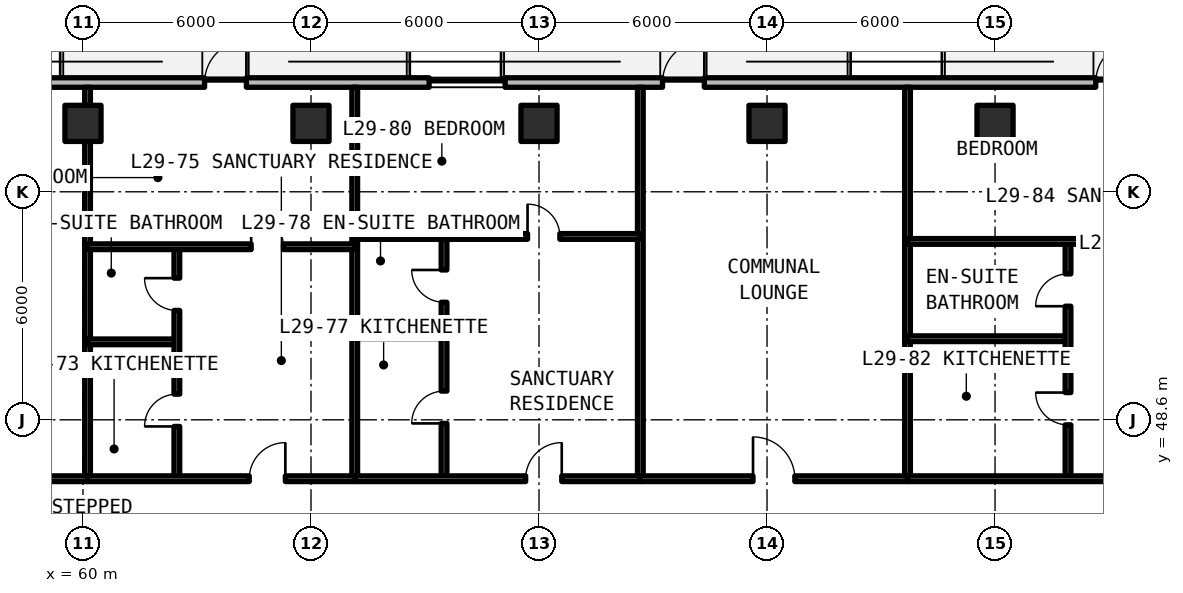
"""IFC4 building model, lengths in metres.
Left out: names, types, materials, properties, quantities, classifications, styles, units other than length and angle.
Written with IfcOpenShell. Run it as: python <this file> out.ifc"""

import sys

from ifc_helpers import new_model, si_unit, direction, frame, frame_2d, origin, origin_2d, place, context, subcontext, project, spatial, rectangle, extrude, element, fill, save


model = new_model("IFC4")
c1 = context("Model", 3, precision=1e-05, world=origin(), true_north=direction((0.0, 1.0)))
c2 = subcontext(c1, "Body", "Model", "MODEL_VIEW")
j1 = project(units=[si_unit("LENGTHUNIT", "METRE"), si_unit("PLANEANGLEUNIT", "RADIAN")], contexts=[c1])
p1 = place(None, origin())
s1 = spatial("IfcSite", under=j1, at=p1, CompositionType="ELEMENT")
p2 = place(p1, origin())
s2 = spatial("IfcBuilding", under=s1, at=p2, CompositionType="ELEMENT")
p3 = place(p2, frame((0.0, 0.0, 105.27)))
s3 = spatial("IfcBuildingStorey", under=s2, at=p3, CompositionType="ELEMENT", Elevation=105.27)
for number, where, z_axis, x_axis in (
    (1, (60.0, 56.4, 0.0), (0.0, 0.0, 1.0), (1.0, 0.0, 0.0)),
    (2, (66.0, 56.4, 0.0), (0.0, 0.0, 1.0), (1.0, 0.0, 0.0)),
    (3, (72.0, 56.4, 0.0), (0.0, 0.0, 1.0), (1.0, 0.0, 0.0)),
    (4, (78.0, 56.4, 0.0), (0.0, 0.0, 1.0), (1.0, 0.0, 0.0)),
    (5, (84.0, 56.4, 0.0), (0.0, 0.0, 1.0), (1.0, 0.0, 0.0)),
):
    element("IfcColumn", number, at=place(p3, frame(where, z_axis=z_axis, x_axis=x_axis)), inside=s3, PredefinedType="COLUMN", context=c2, shape_type="SweptSolid", body=[
        extrude(rectangle(XDim=0.95, YDim=0.95, at=origin_2d()), origin(), (0.0, 0.0, 1.0), 3.3),
    ])
p4 = place(p3, frame((96.148, 57.475, 0.0), z_axis=(0.0, 0.0, 1.0), x_axis=(-1.0, 0.0, 0.0)))
e6 = element("IfcWall", 6, at=p4, inside=s3, PredefinedType="SOLIDWALL", context=c2, shape_type="SweptSolid", body=[
    extrude(rectangle(XDim=44.023, YDim=0.25, at=frame_2d((22.012, 0.0))), origin(), (0.0, 0.0, 1.0), 3.08),
])
p5 = place(p4, frame((31.848, 0.0, 0.0)))
e7 = element("IfcOpeningElement", 7, at=p5, cuts=e6, PredefinedType="OPENING", context=c2, shape_type="SweptSolid", body=[
    extrude(rectangle(XDim=1.1, YDim=2.15, at=frame_2d((0.55, 1.075))), frame((0.0, 0.135, 0.0), z_axis=(0.0, -1.0, 0.0), x_axis=(1.0, 0.0, 0.0)), (0.0, 0.0, 1.0), 0.27),
])
p6 = place(p4, frame((19.798, 0.0, 0.0)))
e8 = element("IfcOpeningElement", 8, at=p6, cuts=e6, PredefinedType="OPENING", context=c2, shape_type="SweptSolid", body=[
    extrude(rectangle(XDim=1.1, YDim=2.15, at=frame_2d((0.55, 1.075))), frame((0.0, 0.135, 0.0), z_axis=(0.0, -1.0, 0.0), x_axis=(1.0, 0.0, 0.0)), (0.0, 0.0, 1.0), 0.27),
])
p7 = place(p4, frame((8.398, 0.0, 0.0)))
e9 = element("IfcOpeningElement", 9, at=p7, cuts=e6, PredefinedType="OPENING", context=c2, shape_type="SweptSolid", body=[
    extrude(rectangle(XDim=1.1, YDim=2.15, at=frame_2d((0.55, 1.075))), frame((0.0, 0.135, 0.0), z_axis=(0.0, -1.0, 0.0), x_axis=(1.0, 0.0, 0.0)), (0.0, 0.0, 1.0), 0.27),
])
p8 = place(p4, frame((39.028, 0.0, 0.78)))
e10 = element("IfcOpeningElement", 10, at=p8, cuts=e6, PredefinedType="OPENING", context=c2, shape_type="SweptSolid", body=[
    extrude(rectangle(XDim=2.0, YDim=1.66, at=frame_2d((1.0, 0.83))), frame((0.0, 0.135, 0.0), z_axis=(0.0, -1.0, 0.0), x_axis=(1.0, 0.0, 0.0)), (0.0, 0.0, 1.0), 0.27),
])
p9 = place(p4, frame((25.04, 0.0, 0.78)))
e11 = element("IfcOpeningElement", 11, at=p9, cuts=e6, PredefinedType="OPENING", context=c2, shape_type="SweptSolid", body=[
    extrude(rectangle(XDim=2.0, YDim=1.66, at=frame_2d((1.0, 0.83))), frame((0.0, 0.135, 0.0), z_axis=(0.0, -1.0, 0.0), x_axis=(1.0, 0.0, 0.0)), (0.0, 0.0, 1.0), 0.27),
])
p10 = place(p4, frame((2.664, 0.0, 0.78)))
e12 = element("IfcOpeningElement", 12, at=p10, cuts=e6, PredefinedType="OPENING", context=c2, shape_type="SweptSolid", body=[
    extrude(rectangle(XDim=2.0, YDim=1.66, at=frame_2d((1.0, 0.83))), frame((0.0, 0.135, 0.0), z_axis=(0.0, -1.0, 0.0), x_axis=(1.0, 0.0, 0.0)), (0.0, 0.0, 1.0), 0.27),
])
p11 = place(p3, frame((60.12, 47.05, 0.0), z_axis=(0.0, 0.0, 1.0), x_axis=(0.0, 1.0, 0.0)))
e13 = element("IfcWall", 13, at=p11, inside=s3, PredefinedType="SOLIDWALL", context=c2, shape_type="SweptSolid", body=[
    extrude(rectangle(XDim=10.3, YDim=0.15, at=frame_2d((5.15, 0.0))), origin(), (0.0, 0.0, 1.0), 2.35),
])
p12 = place(p3, frame((52.12, 47.05, 0.0), z_axis=(0.0, 0.0, 1.0), x_axis=(1.0, 0.0, 0.0)))
e14 = element("IfcWall", 14, at=p12, inside=s3, PredefinedType="SOLIDWALL", context=c2, shape_type="SweptSolid", body=[
    extrude(rectangle(XDim=8.0, YDim=0.15, at=frame_2d((4.0, 0.0))), origin(), (0.0, 0.0, 1.0), 2.35),
])
p13 = place(p12, frame((3.45, 0.0, 0.0)))
e15 = element("IfcOpeningElement", 15, at=p13, cuts=e14, PredefinedType="OPENING", context=c2, shape_type="SweptSolid", body=[
    extrude(rectangle(XDim=1.1, YDim=2.15, at=frame_2d((0.55, 1.075))), frame((0.0, 0.085, 0.0), z_axis=(0.0, -1.0, 0.0), x_axis=(1.0, 0.0, 0.0)), (0.0, 0.0, 1.0), 0.17),
])
p14 = place(p3, frame((67.151, 47.05, 0.0), z_axis=(0.0, 0.0, 1.0), x_axis=(0.0, 1.0, 0.0)))
e16 = element("IfcWall", 16, at=p14, inside=s3, PredefinedType="SOLIDWALL", context=c2, shape_type="SweptSolid", body=[
    extrude(rectangle(XDim=10.3, YDim=0.15, at=frame_2d((5.15, 0.0))), origin(), (0.0, 0.0, 1.0), 2.35),
])
p15 = place(p3, frame((60.12, 50.651, 0.0), z_axis=(0.0, 0.0, 1.0), x_axis=(1.0, 0.0, 0.0)))
e17 = element("IfcWall", 17, at=p15, inside=s3, PredefinedType="PARTITIONING", context=c2, shape_type="SweptSolid", body=[
    extrude(rectangle(XDim=2.35, YDim=0.15, at=frame_2d((1.175, 0.0))), origin(), (0.0, 0.0, 1.0), 2.35),
])
p16 = place(p3, frame((62.47, 47.05, 0.0), z_axis=(0.0, 0.0, 1.0), x_axis=(0.0, 1.0, 0.0)))
e18 = element("IfcWall", 18, at=p16, inside=s3, PredefinedType="PARTITIONING", context=c2, shape_type="SweptSolid", body=[
    extrude(rectangle(XDim=6.104, YDim=0.15, at=frame_2d((3.052, 0.0))), origin(), (0.0, 0.0, 1.0), 2.35),
])
p17 = place(p16, frame((1.376, 0.0, 0.0)))
e19 = element("IfcOpeningElement", 19, at=p17, cuts=e18, PredefinedType="OPENING", context=c2, shape_type="SweptSolid", body=[
    extrude(rectangle(XDim=0.85, YDim=2.1, at=frame_2d((0.425, 1.05))), frame((0.0, 0.085, 0.0), z_axis=(0.0, -1.0, 0.0), x_axis=(1.0, 0.0, 0.0)), (0.0, 0.0, 1.0), 0.17),
])
p18 = place(p16, frame((4.428, 0.0, 0.0)))
e20 = element("IfcOpeningElement", 20, at=p18, cuts=e18, PredefinedType="OPENING", context=c2, shape_type="SweptSolid", body=[
    extrude(rectangle(XDim=0.85, YDim=2.1, at=frame_2d((0.425, 1.05))), frame((0.0, 0.085, 0.0), z_axis=(0.0, -1.0, 0.0), x_axis=(1.0, 0.0, 0.0)), (0.0, 0.0, 1.0), 0.17),
])
p19 = place(p3, frame((60.12, 53.154, 0.0), z_axis=(0.0, 0.0, 1.0), x_axis=(1.0, 0.0, 0.0)))
e21 = element("IfcWall", 21, at=p19, inside=s3, PredefinedType="PARTITIONING", context=c2, shape_type="SweptSolid", body=[
    extrude(rectangle(XDim=7.031, YDim=0.15, at=frame_2d((3.515, 0.0))), origin(), (0.0, 0.0, 1.0), 2.35),
])
p20 = place(p19, frame((4.305, 0.0, 0.0)))
e22 = element("IfcOpeningElement", 22, at=p20, cuts=e21, PredefinedType="OPENING", context=c2, shape_type="SweptSolid", body=[
    extrude(rectangle(XDim=0.85, YDim=2.1, at=frame_2d((0.425, 1.05))), frame((0.0, 0.085, 0.0), z_axis=(0.0, -1.0, 0.0), x_axis=(1.0, 0.0, 0.0)), (0.0, 0.0, 1.0), 0.17),
])
p21 = place(p3, frame((60.12, 47.05, 0.0), z_axis=(0.0, 0.0, 1.0), x_axis=(1.0, 0.0, 0.0)))
e23 = element("IfcWall", 23, at=p21, inside=s3, PredefinedType="SOLIDWALL", context=c2, shape_type="SweptSolid", body=[
    extrude(rectangle(XDim=7.031, YDim=0.15, at=frame_2d((3.515, 0.0))), origin(), (0.0, 0.0, 1.0), 2.35),
])
p22 = place(p21, frame((4.255, 0.0, 0.0)))
e24 = element("IfcOpeningElement", 24, at=p22, cuts=e23, PredefinedType="OPENING", context=c2, shape_type="SweptSolid", body=[
    extrude(rectangle(XDim=0.95, YDim=2.15, at=frame_2d((0.475, 1.075))), frame((0.0, 0.085, 0.0), z_axis=(0.0, -1.0, 0.0), x_axis=(1.0, 0.0, 0.0)), (0.0, 0.0, 1.0), 0.17),
])
p23 = place(p3, frame((74.666, 47.05, 0.0), z_axis=(0.0, 0.0, 1.0), x_axis=(0.0, 1.0, 0.0)))
e25 = element("IfcWall", 25, at=p23, inside=s3, PredefinedType="SOLIDWALL", context=c2, shape_type="SweptSolid", body=[
    extrude(rectangle(XDim=10.3, YDim=0.15, at=frame_2d((5.15, 0.0))), origin(), (0.0, 0.0, 1.0), 2.35),
])
p24 = place(p3, frame((67.151, 50.811, 0.0), z_axis=(0.0, 0.0, 1.0), x_axis=(1.0, 0.0, 0.0)))
e26 = element("IfcWall", 26, at=p24, inside=s3, PredefinedType="PARTITIONING", context=c2, shape_type="SweptSolid", body=[
    extrude(rectangle(XDim=2.35, YDim=0.15, at=frame_2d((1.175, 0.0))), origin(), (0.0, 0.0, 1.0), 2.35),
])
p25 = place(p3, frame((69.501, 47.05, 0.0), z_axis=(0.0, 0.0, 1.0), x_axis=(0.0, 1.0, 0.0)))
e27 = element("IfcWall", 27, at=p25, inside=s3, PredefinedType="PARTITIONING", context=c2, shape_type="SweptSolid", body=[
    extrude(rectangle(XDim=6.375, YDim=0.15, at=frame_2d((3.188, 0.0))), origin(), (0.0, 0.0, 1.0), 2.35),
])
p26 = place(p25, frame((1.456, 0.0, 0.0)))
e28 = element("IfcOpeningElement", 28, at=p26, cuts=e27, PredefinedType="OPENING", context=c2, shape_type="SweptSolid", body=[
    extrude(rectangle(XDim=0.85, YDim=2.1, at=frame_2d((0.425, 1.05))), frame((0.0, 0.085, 0.0), z_axis=(0.0, -1.0, 0.0), x_axis=(1.0, 0.0, 0.0)), (0.0, 0.0, 1.0), 0.17),
])
p27 = place(p25, frame((4.643, 0.0, 0.0)))
e29 = element("IfcOpeningElement", 29, at=p27, cuts=e27, PredefinedType="OPENING", context=c2, shape_type="SweptSolid", body=[
    extrude(rectangle(XDim=0.85, YDim=2.1, at=frame_2d((0.425, 1.05))), frame((0.0, 0.085, 0.0), z_axis=(0.0, -1.0, 0.0), x_axis=(1.0, 0.0, 0.0)), (0.0, 0.0, 1.0), 0.17),
])
p28 = place(p3, frame((67.151, 53.425, 0.0), z_axis=(0.0, 0.0, 1.0), x_axis=(1.0, 0.0, 0.0)))
e30 = element("IfcWall", 30, at=p28, inside=s3, PredefinedType="PARTITIONING", context=c2, shape_type="SweptSolid", body=[
    extrude(rectangle(XDim=7.515, YDim=0.15, at=frame_2d((3.758, 0.0))), origin(), (0.0, 0.0, 1.0), 2.35),
])
p29 = place(p28, frame((4.548, 0.0, 0.0)))
e31 = element("IfcOpeningElement", 31, at=p29, cuts=e30, PredefinedType="OPENING", context=c2, shape_type="SweptSolid", body=[
    extrude(rectangle(XDim=0.85, YDim=2.1, at=frame_2d((0.425, 1.05))), frame((0.0, 0.085, 0.0), z_axis=(0.0, -1.0, 0.0), x_axis=(1.0, 0.0, 0.0)), (0.0, 0.0, 1.0), 0.17),
])
p30 = place(p3, frame((67.151, 47.05, 0.0), z_axis=(0.0, 0.0, 1.0), x_axis=(1.0, 0.0, 0.0)))
e32 = element("IfcWall", 32, at=p30, inside=s3, PredefinedType="SOLIDWALL", context=c2, shape_type="SweptSolid", body=[
    extrude(rectangle(XDim=7.515, YDim=0.15, at=frame_2d((3.758, 0.0))), origin(), (0.0, 0.0, 1.0), 2.35),
])
p31 = place(p30, frame((4.498, 0.0, 0.0)))
e33 = element("IfcOpeningElement", 33, at=p31, cuts=e32, PredefinedType="OPENING", context=c2, shape_type="SweptSolid", body=[
    extrude(rectangle(XDim=0.95, YDim=2.15, at=frame_2d((0.475, 1.075))), frame((0.0, 0.085, 0.0), z_axis=(0.0, -1.0, 0.0), x_axis=(1.0, 0.0, 0.0)), (0.0, 0.0, 1.0), 0.17),
])
p32 = place(p3, frame((81.697, 47.05, 0.0), z_axis=(0.0, 0.0, 1.0), x_axis=(0.0, 1.0, 0.0)))
e34 = element("IfcWall", 34, at=p32, inside=s3, PredefinedType="SOLIDWALL", context=c2, shape_type="SweptSolid", body=[
    extrude(rectangle(XDim=10.3, YDim=0.15, at=frame_2d((5.15, 0.0))), origin(), (0.0, 0.0, 1.0), 2.35),
])
p33 = place(p3, frame((74.666, 47.05, 0.0), z_axis=(0.0, 0.0, 1.0), x_axis=(1.0, 0.0, 0.0)))
e35 = element("IfcWall", 35, at=p33, inside=s3, PredefinedType="SOLIDWALL", context=c2, shape_type="SweptSolid", body=[
    extrude(rectangle(XDim=7.031, YDim=0.15, at=frame_2d((3.515, 0.0))), origin(), (0.0, 0.0, 1.0), 2.35),
])
p34 = place(p33, frame((2.965, 0.0, 0.0)))
e36 = element("IfcOpeningElement", 36, at=p34, cuts=e35, PredefinedType="OPENING", context=c2, shape_type="SweptSolid", body=[
    extrude(rectangle(XDim=1.1, YDim=2.15, at=frame_2d((0.55, 1.075))), frame((0.0, 0.085, 0.0), z_axis=(0.0, -1.0, 0.0), x_axis=(1.0, 0.0, 0.0)), (0.0, 0.0, 1.0), 0.17),
])
p35 = place(p3, frame((81.697, 50.734, 0.0), z_axis=(0.0, 0.0, 1.0), x_axis=(1.0, 0.0, 0.0)))
e37 = element("IfcWall", 37, at=p35, inside=s3, PredefinedType="PARTITIONING", context=c2, shape_type="SweptSolid", body=[
    extrude(rectangle(XDim=4.223, YDim=0.15, at=frame_2d((2.112, 0.0))), origin(), (0.0, 0.0, 1.0), 2.35),
])
p36 = place(p3, frame((85.92, 47.05, 0.0), z_axis=(0.0, 0.0, 1.0), x_axis=(0.0, 1.0, 0.0)))
e38 = element("IfcWall", 38, at=p36, inside=s3, PredefinedType="PARTITIONING", context=c2, shape_type="SweptSolid", body=[
    extrude(rectangle(XDim=6.244, YDim=0.15, at=frame_2d((3.122, 0.0))), origin(), (0.0, 0.0, 1.0), 2.35),
])
p37 = place(p36, frame((1.417, 0.0, 0.0)))
e39 = element("IfcOpeningElement", 39, at=p37, cuts=e38, PredefinedType="OPENING", context=c2, shape_type="SweptSolid", body=[
    extrude(rectangle(XDim=0.85, YDim=2.1, at=frame_2d((0.425, 1.05))), frame((0.0, 0.085, 0.0), z_axis=(0.0, -1.0, 0.0), x_axis=(1.0, 0.0, 0.0)), (0.0, 0.0, 1.0), 0.17),
])
p38 = place(p36, frame((4.539, 0.0, 0.0)))
e40 = element("IfcOpeningElement", 40, at=p38, cuts=e38, PredefinedType="OPENING", context=c2, shape_type="SweptSolid", body=[
    extrude(rectangle(XDim=0.85, YDim=2.1, at=frame_2d((0.425, 1.05))), frame((0.0, 0.085, 0.0), z_axis=(0.0, -1.0, 0.0), x_axis=(1.0, 0.0, 0.0)), (0.0, 0.0, 1.0), 0.17),
])
p39 = place(p3, frame((81.697, 53.294, 0.0), z_axis=(0.0, 0.0, 1.0), x_axis=(1.0, 0.0, 0.0)))
e41 = element("IfcWall", 41, at=p39, inside=s3, PredefinedType="PARTITIONING", context=c2, shape_type="SweptSolid", body=[
    extrude(rectangle(XDim=7.273, YDim=0.15, at=frame_2d((3.636, 0.0))), origin(), (0.0, 0.0, 1.0), 2.35),
])
p40 = place(p39, frame((5.363, 0.0, 0.0)))
e42 = element("IfcOpeningElement", 42, at=p40, cuts=e41, PredefinedType="OPENING", context=c2, shape_type="SweptSolid", body=[
    extrude(rectangle(XDim=0.85, YDim=2.1, at=frame_2d((0.425, 1.05))), frame((0.0, 0.085, 0.0), z_axis=(0.0, -1.0, 0.0), x_axis=(1.0, 0.0, 0.0)), (0.0, 0.0, 1.0), 0.17),
])
p41 = place(p3, frame((81.697, 47.05, 0.0), z_axis=(0.0, 0.0, 1.0), x_axis=(1.0, 0.0, 0.0)))
e43 = element("IfcWall", 43, at=p41, inside=s3, PredefinedType="SOLIDWALL", context=c2, shape_type="SweptSolid", body=[
    extrude(rectangle(XDim=7.273, YDim=0.15, at=frame_2d((3.636, 0.0))), origin(), (0.0, 0.0, 1.0), 2.35),
])
p42 = place(p41, frame((5.313, 0.0, 0.0)))
e44 = element("IfcOpeningElement", 44, at=p42, cuts=e43, PredefinedType="OPENING", context=c2, shape_type="SweptSolid", body=[
    extrude(rectangle(XDim=0.95, YDim=2.15, at=frame_2d((0.475, 1.075))), frame((0.0, 0.085, 0.0), z_axis=(0.0, -1.0, 0.0), x_axis=(1.0, 0.0, 0.0)), (0.0, 0.0, 1.0), 0.17),
])
p43 = place(p5, frame((1.1, 0.0, 0.0), z_axis=(0.0, 0.0, 1.0), x_axis=(-1.0, 0.0, 0.0)))
e45 = element("IfcDoor", 45, at=p43, inside=s3, OperationType="SINGLE_SWING_RIGHT", PredefinedType="DOOR", context=c2, shape_type="SweptSolid", body=[
    extrude(rectangle(XDim=1.1, YDim=2.15, at=frame_2d((0.55, 1.075))), frame((0.0, 0.025, 0.0), z_axis=(0.0, -1.0, 0.0), x_axis=(1.0, 0.0, 0.0)), (0.0, 0.0, 1.0), 0.05),
])
fill(e7, e45)
p44 = place(p6, frame((1.1, 0.0, 0.0), z_axis=(0.0, 0.0, 1.0), x_axis=(-1.0, 0.0, 0.0)))
e46 = element("IfcDoor", 46, at=p44, inside=s3, OperationType="SINGLE_SWING_LEFT", PredefinedType="DOOR", context=c2, shape_type="SweptSolid", body=[
    extrude(rectangle(XDim=1.1, YDim=2.15, at=frame_2d((0.55, 1.075))), frame((0.0, 0.025, 0.0), z_axis=(0.0, -1.0, 0.0), x_axis=(1.0, 0.0, 0.0)), (0.0, 0.0, 1.0), 0.05),
])
fill(e8, e46)
p45 = place(p7, frame((1.1, 0.0, 0.0), z_axis=(0.0, 0.0, 1.0), x_axis=(-1.0, 0.0, 0.0)))
e47 = element("IfcDoor", 47, at=p45, inside=s3, OperationType="SINGLE_SWING_RIGHT", PredefinedType="DOOR", context=c2, shape_type="SweptSolid", body=[
    extrude(rectangle(XDim=1.1, YDim=2.15, at=frame_2d((0.55, 1.075))), frame((0.0, 0.025, 0.0), z_axis=(0.0, -1.0, 0.0), x_axis=(1.0, 0.0, 0.0)), (0.0, 0.0, 1.0), 0.05),
])
fill(e9, e47)
p46 = place(p9, origin())
e48 = element("IfcWindow", 48, at=p46, inside=s3, PartitioningType="SINGLE_PANEL", PredefinedType="WINDOW", context=c2, shape_type="SweptSolid", body=[
    extrude(rectangle(XDim=2.0, YDim=1.66, at=frame_2d((1.0, 0.83))), frame((0.0, 0.03, 0.0), z_axis=(0.0, -1.0, 0.0), x_axis=(1.0, 0.0, 0.0)), (0.0, 0.0, 1.0), 0.06),
])
fill(e11, e48)
p47 = place(p17, origin())
e49 = element("IfcDoor", 49, at=p47, inside=s3, OperationType="SINGLE_SWING_LEFT", PredefinedType="DOOR", context=c2, shape_type="SweptSolid", body=[
    extrude(rectangle(XDim=0.85, YDim=2.1, at=frame_2d((0.425, 1.05))), frame((0.0, 0.025, 0.0), z_axis=(0.0, -1.0, 0.0), x_axis=(1.0, 0.0, 0.0)), (0.0, 0.0, 1.0), 0.05),
])
fill(e19, e49)
p48 = place(p18, origin())
e50 = element("IfcDoor", 50, at=p48, inside=s3, OperationType="SINGLE_SWING_RIGHT", PredefinedType="DOOR", context=c2, shape_type="SweptSolid", body=[
    extrude(rectangle(XDim=0.85, YDim=2.1, at=frame_2d((0.425, 1.05))), frame((0.0, 0.025, 0.0), z_axis=(0.0, -1.0, 0.0), x_axis=(1.0, 0.0, 0.0)), (0.0, 0.0, 1.0), 0.05),
])
fill(e20, e50)
p49 = place(p20, origin())
e51 = element("IfcDoor", 51, at=p49, inside=s3, OperationType="SINGLE_SWING_LEFT", PredefinedType="DOOR", context=c2, shape_type="SweptSolid", body=[
    extrude(rectangle(XDim=0.85, YDim=2.1, at=frame_2d((0.425, 1.05))), frame((0.0, 0.025, 0.0), z_axis=(0.0, -1.0, 0.0), x_axis=(1.0, 0.0, 0.0)), (0.0, 0.0, 1.0), 0.05),
])
fill(e22, e51)
p50 = place(p22, origin())
e52 = element("IfcDoor", 52, at=p50, inside=s3, OperationType="SINGLE_SWING_RIGHT", PredefinedType="DOOR", context=c2, shape_type="SweptSolid", body=[
    extrude(rectangle(XDim=0.95, YDim=2.15, at=frame_2d((0.475, 1.075))), frame((0.0, 0.025, 0.0), z_axis=(0.0, -1.0, 0.0), x_axis=(1.0, 0.0, 0.0)), (0.0, 0.0, 1.0), 0.05),
])
fill(e24, e52)
p51 = place(p26, origin())
e53 = element("IfcDoor", 53, at=p51, inside=s3, OperationType="SINGLE_SWING_LEFT", PredefinedType="DOOR", context=c2, shape_type="SweptSolid", body=[
    extrude(rectangle(XDim=0.85, YDim=2.1, at=frame_2d((0.425, 1.05))), frame((0.0, 0.025, 0.0), z_axis=(0.0, -1.0, 0.0), x_axis=(1.0, 0.0, 0.0)), (0.0, 0.0, 1.0), 0.05),
])
fill(e28, e53)
p52 = place(p27, origin())
e54 = element("IfcDoor", 54, at=p52, inside=s3, OperationType="SINGLE_SWING_RIGHT", PredefinedType="DOOR", context=c2, shape_type="SweptSolid", body=[
    extrude(rectangle(XDim=0.85, YDim=2.1, at=frame_2d((0.425, 1.05))), frame((0.0, 0.025, 0.0), z_axis=(0.0, -1.0, 0.0), x_axis=(1.0, 0.0, 0.0)), (0.0, 0.0, 1.0), 0.05),
])
fill(e29, e54)
p53 = place(p29, origin())
e55 = element("IfcDoor", 55, at=p53, inside=s3, OperationType="SINGLE_SWING_LEFT", PredefinedType="DOOR", context=c2, shape_type="SweptSolid", body=[
    extrude(rectangle(XDim=0.85, YDim=2.1, at=frame_2d((0.425, 1.05))), frame((0.0, 0.025, 0.0), z_axis=(0.0, -1.0, 0.0), x_axis=(1.0, 0.0, 0.0)), (0.0, 0.0, 1.0), 0.05),
])
fill(e31, e55)
p54 = place(p31, origin())
e56 = element("IfcDoor", 56, at=p54, inside=s3, OperationType="SINGLE_SWING_RIGHT", PredefinedType="DOOR", context=c2, shape_type="SweptSolid", body=[
    extrude(rectangle(XDim=0.95, YDim=2.15, at=frame_2d((0.475, 1.075))), frame((0.0, 0.025, 0.0), z_axis=(0.0, -1.0, 0.0), x_axis=(1.0, 0.0, 0.0)), (0.0, 0.0, 1.0), 0.05),
])
fill(e33, e56)
p55 = place(p34, origin())
e57 = element("IfcDoor", 57, at=p55, inside=s3, OperationType="SINGLE_SWING_LEFT", PredefinedType="DOOR", context=c2, shape_type="SweptSolid", body=[
    extrude(rectangle(XDim=1.1, YDim=2.15, at=frame_2d((0.55, 1.075))), frame((0.0, 0.025, 0.0), z_axis=(0.0, -1.0, 0.0), x_axis=(1.0, 0.0, 0.0)), (0.0, 0.0, 1.0), 0.05),
])
fill(e36, e57)
p56 = place(p37, origin())
e58 = element("IfcDoor", 58, at=p56, inside=s3, OperationType="SINGLE_SWING_RIGHT", PredefinedType="DOOR", context=c2, shape_type="SweptSolid", body=[
    extrude(rectangle(XDim=0.85, YDim=2.1, at=frame_2d((0.425, 1.05))), frame((0.0, 0.025, 0.0), z_axis=(0.0, -1.0, 0.0), x_axis=(1.0, 0.0, 0.0)), (0.0, 0.0, 1.0), 0.05),
])
fill(e39, e58)
p57 = place(p38, origin())
e59 = element("IfcDoor", 59, at=p57, inside=s3, OperationType="SINGLE_SWING_LEFT", PredefinedType="DOOR", context=c2, shape_type="SweptSolid", body=[
    extrude(rectangle(XDim=0.85, YDim=2.1, at=frame_2d((0.425, 1.05))), frame((0.0, 0.025, 0.0), z_axis=(0.0, -1.0, 0.0), x_axis=(1.0, 0.0, 0.0)), (0.0, 0.0, 1.0), 0.05),
])
fill(e40, e59)
save(model, sys.argv[1])
